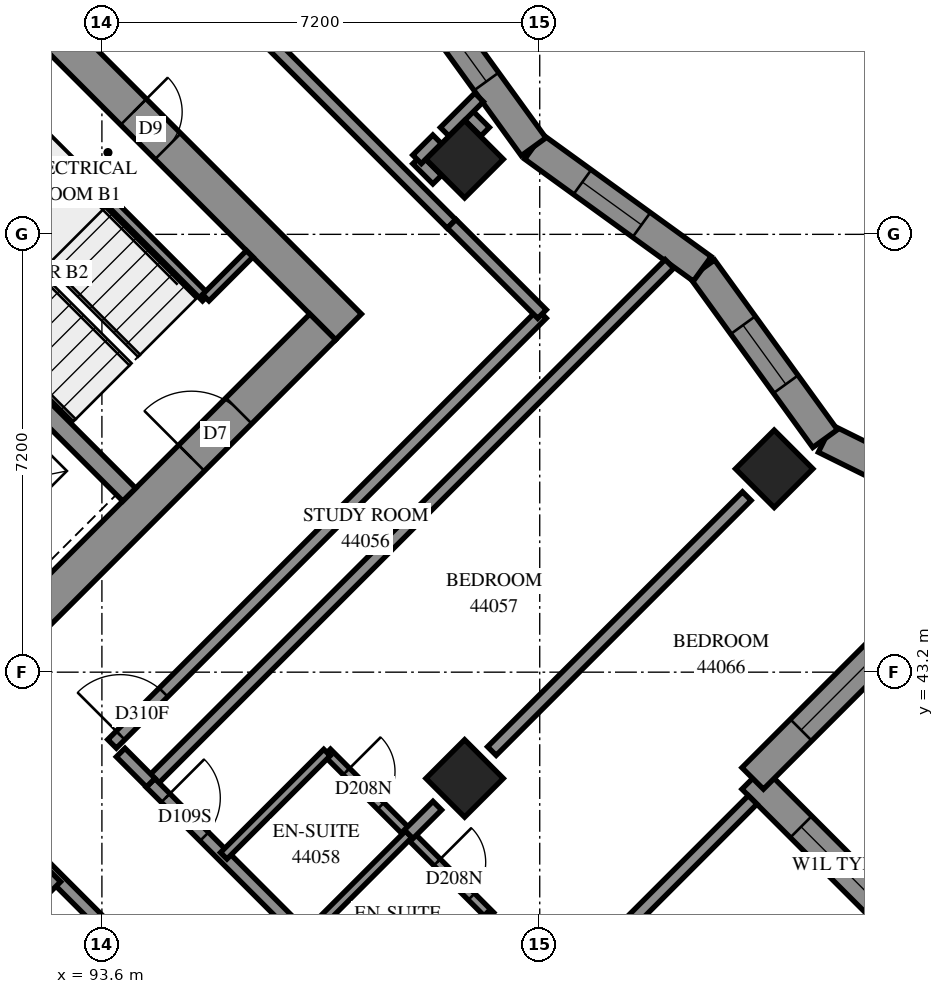
"""IFC4 building model, lengths in metres.
Left out: names, types, materials, properties, quantities, classifications, styles, units other than length and angle.
Written with IfcOpenShell. Run it as: python <this file> out.ifc"""

import sys

from ifc_helpers import new_model, si_unit, direction, frame, frame_2d, origin, origin_2d, place, context, subcontext, project, spatial, polyline, rectangle, outline, extrude, element, fill, save


model = new_model("IFC4")
c1 = context("Model", 3, precision=1e-05, world=origin(), true_north=direction((0.0, 1.0)))
c2 = subcontext(c1, "Body", "Model", "MODEL_VIEW")
j1 = project(units=[si_unit("LENGTHUNIT", "METRE"), si_unit("PLANEANGLEUNIT", "RADIAN")], contexts=[c1])
p1 = place(None, origin())
s1 = spatial("IfcSite", under=j1, at=p1, CompositionType="ELEMENT")
p2 = place(p1, origin())
s2 = spatial("IfcBuilding", under=s1, at=p2, CompositionType="ELEMENT")
p3 = place(p2, frame((0.0, 0.0, 162.6)))
s3 = spatial("IfcBuildingStorey", under=s2, at=p3, CompositionType="ELEMENT", Elevation=162.6)
for number, where, z_axis, x_axis in (
    (1, (99.565, 51.635, 0.0), (0.0, 0.0, 1.0), (0.707, -0.707, 0.0)),
    (2, (104.656, 46.544, 0.0), (0.0, 0.0, 1.0), (0.707, -0.707, 0.0)),
    (3, (99.565, 41.453, 0.0), (0.0, 0.0, 1.0), (0.707, -0.707, 0.0)),
):
    element("IfcColumn", number, at=place(p3, frame(where, z_axis=z_axis, x_axis=x_axis)), inside=s3, PredefinedType="COLUMN", context=c2, shape_type="SweptSolid", body=[
        extrude(rectangle(XDim=0.9, YDim=0.9, at=origin_2d()), origin(), (0.0, 0.0, 1.0), 3.1),
    ])
p4 = place(p3, frame((86.625, 59.908, -0.3), z_axis=(0.0, 0.0, 1.0), x_axis=(0.7071067812, -0.7071067812, 0.0)))
e4 = element("IfcWall", 4, at=p4, inside=s3, PredefinedType="SHEAR", context=c2, shape_type="SweptSolid", body=[
    extrude(rectangle(XDim=15.6, YDim=0.6, at=frame_2d((7.8, 0.0))), origin(), (0.0, 0.0, 1.0), 2.7),
])
p5 = place(p4, frame((10.6, 0.0, 0.3)))
e5 = element("IfcOpeningElement", 5, at=p5, cuts=e4, PredefinedType="OPENING", context=c2, shape_type="SweptSolid", body=[
    extrude(rectangle(XDim=0.8, YDim=2.1, at=frame_2d((0.4, 1.05))), frame((0.0, 0.31, 0.0), z_axis=(0.0, -1.0, 0.0), x_axis=(1.0, 0.0, 0.0)), (0.0, 0.0, 1.0), 0.62),
])
p6 = place(p3, frame((87.049, 38.695, -0.3), z_axis=(0.0, 0.0, 1.0), x_axis=(0.7071067812, 0.7071067812, 0.0)))
e6 = element("IfcWall", 6, at=p6, inside=s3, PredefinedType="SHEAR", context=c2, shape_type="SweptSolid", body=[
    extrude(rectangle(XDim=14.4, YDim=0.6, at=frame_2d((7.2, 0.0))), origin(), (0.0, 0.0, 1.0), 2.7),
])
p7 = place(p6, frame((4.55, 0.0, 0.3)))
e7 = element("IfcOpeningElement", 7, at=p7, cuts=e6, PredefinedType="OPENING", context=c2, shape_type="SweptSolid", body=[
    extrude(rectangle(XDim=1.1, YDim=2.1, at=frame_2d((0.55, 1.05))), frame((0.0, 0.31, 0.0), z_axis=(0.0, -1.0, 0.0), x_axis=(1.0, 0.0, 0.0)), (0.0, 0.0, 1.0), 0.62),
])
p8 = place(p6, frame((11.35, 0.0, 0.3)))
e8 = element("IfcOpeningElement", 8, at=p8, cuts=e6, PredefinedType="OPENING", context=c2, shape_type="SweptSolid", body=[
    extrude(rectangle(XDim=1.1, YDim=2.1, at=frame_2d((0.55, 1.05))), frame((0.0, 0.31, 0.0), z_axis=(0.0, -1.0, 0.0), x_axis=(1.0, 0.0, 0.0)), (0.0, 0.0, 1.0), 0.62),
])
p9 = place(p3, frame((88.958, 51.211, 0.0), z_axis=(0.0, 0.0, 1.0), x_axis=(0.7070998367, -0.7071137256, 0.0)))
e9 = element("IfcWall", 9, at=p9, inside=s3, PredefinedType="SOLIDWALL", context=c2, shape_type="SweptSolid", body=[
    extrude(rectangle(XDim=7.2, YDim=0.3, at=frame_2d((3.6, 0.0))), origin(), (0.0, 0.0, 1.0), 3.1),
])
p10 = place(p3, frame((107.761, 37.994, 0.0), z_axis=(0.0, 0.0, 1.0), x_axis=(-0.707127224, 0.7070863378, 0.0)))
e10 = element("IfcWall", 10, at=p10, inside=s3, PredefinedType="SOLIDWALL", context=c2, shape_type="SweptSolid", body=[
    extrude(outline(polyline([(-0.159, -0.25), (4.642, -0.25), (5.142, 0.25), (0.159, 0.25), (-0.159, -0.25)])), origin(), (0.0, 0.0, 1.0), 3.1),
])
p11 = place(p10, frame((1.967, 0.0, 0.6)))
e11 = element("IfcOpeningElement", 11, at=p11, cuts=e10, PredefinedType="OPENING", context=c2, shape_type="SweptSolid", body=[
    extrude(rectangle(XDim=1.8, YDim=1.9, at=frame_2d((0.9, 0.95))), frame((0.0, 0.26, 0.0), z_axis=(0.0, -1.0, 0.0), x_axis=(1.0, 0.0, 0.0)), (0.0, 0.0, 1.0), 0.52),
])
p12 = place(p3, frame((104.302, 41.453, 0.0), z_axis=(0.0, 0.0, 1.0), x_axis=(0.7071153373, 0.707098225, 0.0)))
e12 = element("IfcWall", 12, at=p12, inside=s3, PredefinedType="SOLIDWALL", context=c2, shape_type="SweptSolid", body=[
    extrude(outline(polyline([(0.25, -0.25), (6.192, -0.25), (5.495, 0.25), (-0.25, 0.25), (0.25, -0.25)])), origin(), (0.0, 0.0, 1.0), 3.1),
])
p13 = place(p12, frame((1.125, 0.0, 0.6)))
e13 = element("IfcOpeningElement", 13, at=p13, cuts=e12, PredefinedType="OPENING", context=c2, shape_type="SweptSolid", body=[
    extrude(rectangle(XDim=1.8, YDim=1.9, at=frame_2d((0.9, 0.95))), frame((0.0, 0.26, 0.0), z_axis=(0.0, -1.0, 0.0), x_axis=(1.0, 0.0, 0.0)), (0.0, 0.0, 1.0), 0.52),
])
p14 = place(p12, frame((3.973, 0.0, 0.6)))
e14 = element("IfcOpeningElement", 14, at=p14, cuts=e12, PredefinedType="OPENING", context=c2, shape_type="SweptSolid", body=[
    extrude(rectangle(XDim=1.2, YDim=1.9, at=frame_2d((0.6, 0.95))), frame((0.0, 0.26, 0.0), z_axis=(0.0, -1.0, 0.0), x_axis=(1.0, 0.0, 0.0)), (0.0, 0.0, 1.0), 0.52),
])
p15 = place(p3, frame((108.434, 45.585, 0.0), z_axis=(0.0, 0.0, 1.0), x_axis=(-0.8962055872, 0.443638981, 0.0)))
e15 = element("IfcWall", 15, at=p15, inside=s3, PredefinedType="SOLIDWALL", context=c2, shape_type="SweptSolid", body=[
    extrude(outline(polyline([(-0.348, -0.25), (3.22, -0.25), (3.344, 0.25), (0.348, 0.25), (-0.348, -0.25)])), origin(), (0.0, 0.0, 1.0), 3.1),
])
p16 = place(p15, frame((1.215, 0.0, 0.45)))
e16 = element("IfcOpeningElement", 16, at=p16, cuts=e15, PredefinedType="OPENING", context=c2, shape_type="SweptSolid", body=[
    extrude(rectangle(XDim=1.2, YDim=2.5, at=frame_2d((0.6, 1.25))), frame((0.0, 0.26, 0.0), z_axis=(0.0, -1.0, 0.0), x_axis=(1.0, 0.0, 0.0)), (0.0, 0.0, 1.0), 0.52),
])
p17 = place(p3, frame((105.493, 47.041, 0.0), z_axis=(0.0, 0.0, 1.0), x_axis=(-0.5862701639, 0.8101156059, 0.0)))
e17 = element("IfcWall", 17, at=p17, inside=s3, PredefinedType="SOLIDWALL", context=c2, shape_type="SweptSolid", body=[
    extrude(outline(polyline([(0.062, -0.25), (3.486, -0.25), (3.406, 0.25), (-0.062, 0.25), (0.062, -0.25)])), origin(), (0.0, 0.0, 1.0), 3.1),
])
p18 = place(p17, frame((1.103, 0.0, 0.45)))
e18 = element("IfcOpeningElement", 18, at=p18, cuts=e17, PredefinedType="OPENING", context=c2, shape_type="SweptSolid", body=[
    extrude(rectangle(XDim=1.2, YDim=2.5, at=frame_2d((0.6, 1.25))), frame((0.0, 0.26, 0.0), z_axis=(0.0, -1.0, 0.0), x_axis=(1.0, 0.0, 0.0)), (0.0, 0.0, 1.0), 0.52),
])
p19 = place(p3, frame((103.473, 49.833, 0.0), z_axis=(0.0, 0.0, 1.0), x_axis=(-0.8101205268, 0.586263364, 0.0)))
e19 = element("IfcWall", 19, at=p19, inside=s3, PredefinedType="SOLIDWALL", context=c2, shape_type="SweptSolid", body=[
    extrude(outline(polyline([(-0.04, -0.25), (3.384, -0.25), (3.464, 0.25), (0.04, 0.25), (-0.04, -0.25)])), origin(), (0.0, 0.0, 1.0), 3.1),
])
p20 = place(p19, frame((1.234, 0.0, 0.45)))
e20 = element("IfcOpeningElement", 20, at=p20, cuts=e19, PredefinedType="OPENING", context=c2, shape_type="SweptSolid", body=[
    extrude(rectangle(XDim=1.2, YDim=2.5, at=frame_2d((0.6, 1.25))), frame((0.0, 0.26, 0.0), z_axis=(0.0, -1.0, 0.0), x_axis=(1.0, 0.0, 0.0)), (0.0, 0.0, 1.0), 0.52),
])
p21 = place(p3, frame((100.699, 51.84, 0.0), z_axis=(0.0, 0.0, 1.0), x_axis=(-0.5862441964, 0.8101343976, 0.0)))
e21 = element("IfcWall", 21, at=p21, inside=s3, PredefinedType="SOLIDWALL", context=c2, shape_type="SweptSolid", body=[
    extrude(outline(polyline([(0.04, -0.25), (3.464, -0.25), (3.384, 0.25), (-0.04, 0.25), (0.04, -0.25)])), origin(), (0.0, 0.0, 1.0), 3.1),
])
p22 = place(p21, frame((1.325, 0.0, 0.45)))
e22 = element("IfcOpeningElement", 22, at=p22, cuts=e21, PredefinedType="OPENING", context=c2, shape_type="SweptSolid", body=[
    extrude(rectangle(XDim=1.2, YDim=2.5, at=frame_2d((0.6, 1.25))), frame((0.0, 0.26, 0.0), z_axis=(0.0, -1.0, 0.0), x_axis=(1.0, 0.0, 0.0)), (0.0, 0.0, 1.0), 0.52),
])
p23 = place(p3, frame((91.313, 53.354, 0.0), z_axis=(0.0, 0.0, 1.0), x_axis=(0.7071067812, -0.7071067812, 0.0)))
e23 = element("IfcWall", 23, at=p23, inside=s3, PredefinedType="PARTITIONING", context=c2, shape_type="SweptSolid", body=[
    extrude(rectangle(XDim=5.65, YDim=0.15, at=frame_2d((2.825, 0.0))), origin(), (0.0, 0.0, 1.0), 3.1),
])
p24 = place(p3, frame((95.308, 49.358, 0.0), z_axis=(0.0, 0.0, 1.0), x_axis=(0.70705776, 0.707155799, 0.0)))
e24 = element("IfcWall", 24, at=p24, inside=s3, PredefinedType="PARTITIONING", context=c2, shape_type="SweptSolid", body=[
    extrude(rectangle(XDim=1.02, YDim=0.15, at=frame_2d((0.51, 0.0))), origin(), (0.0, 0.0, 1.0), 3.1),
])
p25 = place(p3, frame((94.401, 41.383, 0.0), z_axis=(0.0, 0.0, 1.0), x_axis=(0.7071067812, 0.7071067812, 0.0)))
e25 = element("IfcWall", 25, at=p25, inside=s3, PredefinedType="PARTITIONING", context=c2, shape_type="SweptSolid", body=[
    extrude(rectangle(XDim=12.066, YDim=0.2, at=frame_2d((6.033, 0.0))), origin(), (0.0, 0.0, 1.0), 3.1),
])
p26 = place(p3, frame((92.209, 40.459, 0.0), z_axis=(0.0, 0.0, 1.0), x_axis=(0.7071067812, -0.7071067812, 0.0)))
e26 = element("IfcWall", 26, at=p26, inside=s3, PredefinedType="PARTITIONING", context=c2, shape_type="SweptSolid", body=[
    extrude(rectangle(XDim=11.698, YDim=0.2, at=frame_2d((5.849, 0.0))), origin(), (0.0, 0.0, 1.0), 3.1),
])
p27 = place(p26, frame((2.908, 0.0, 0.0)))
e27 = element("IfcOpeningElement", 27, at=p27, cuts=e26, PredefinedType="OPENING", context=c2, shape_type="SweptSolid", body=[
    extrude(rectangle(XDim=0.9, YDim=2.1, at=frame_2d((0.45, 1.05))), frame((0.0, 0.11, 0.0), z_axis=(0.0, -1.0, 0.0), x_axis=(1.0, 0.0, 0.0)), (0.0, 0.0, 1.0), 0.22),
])
p28 = place(p26, frame((10.181, 0.0, 0.0)))
e28 = element("IfcOpeningElement", 28, at=p28, cuts=e26, PredefinedType="OPENING", context=c2, shape_type="SweptSolid", body=[
    extrude(rectangle(XDim=0.9, YDim=2.1, at=frame_2d((0.45, 1.05))), frame((0.0, 0.11, 0.0), z_axis=(0.0, -1.0, 0.0), x_axis=(1.0, 0.0, 0.0)), (0.0, 0.0, 1.0), 0.22),
])
p29 = place(p3, frame((93.767, 42.021, 0.0), z_axis=(0.0, 0.0, 1.0), x_axis=(0.7071067812, 0.7071067812, 0.0)))
e29 = element("IfcWall", 29, at=p29, inside=s3, PredefinedType="PARTITIONING", context=c2, shape_type="SweptSolid", body=[
    extrude(rectangle(XDim=9.998, YDim=0.2, at=frame_2d((4.999, 0.0))), origin(), (0.0, 0.0, 1.0), 3.1),
])
p30 = place(p29, frame((0.196, 0.0, 0.0)))
e30 = element("IfcOpeningElement", 30, at=p30, cuts=e29, PredefinedType="OPENING", context=c2, shape_type="SweptSolid", body=[
    extrude(rectangle(XDim=1.0, YDim=2.1, at=frame_2d((0.5, 1.05))), frame((0.0, 0.11, 0.0), z_axis=(0.0, -1.0, 0.0), x_axis=(1.0, 0.0, 0.0)), (0.0, 0.0, 1.0), 0.22),
])
p31 = place(p3, frame((86.332, 33.309, 0.0), z_axis=(0.0, 0.0, 1.0), x_axis=(0.7072098544, 0.7070036929, 0.0)))
e31 = element("IfcWall", 31, at=p31, inside=s3, PredefinedType="PARTITIONING", context=c2, shape_type="SweptSolid", body=[
    extrude(rectangle(XDim=9.216, YDim=0.2, at=frame_2d((4.608, 0.0))), origin(), (0.0, 0.0, 1.0), 3.1),
])
p32 = place(p3, frame((99.494, 36.292, 0.0), z_axis=(0.0, 0.0, 1.0), x_axis=(0.7071067812, 0.7071067812, 0.0)))
e32 = element("IfcWall", 32, at=p32, inside=s3, PredefinedType="PARTITIONING", context=c2, shape_type="SweptSolid", body=[
    extrude(rectangle(XDim=6.799, YDim=0.2, at=frame_2d((3.4, 0.0))), origin(), (0.0, 0.0, 1.0), 3.1),
])
p33 = place(p3, frame((100.013, 41.903, 0.0), z_axis=(0.0, 0.0, 1.0), x_axis=(0.7071067812, 0.7071067812, 0.0)))
e33 = element("IfcWall", 33, at=p33, inside=s3, PredefinedType="PARTITIONING", context=c2, shape_type="SweptSolid", body=[
    extrude(rectangle(XDim=5.928, YDim=0.2, at=frame_2d((2.964, 0.0))), origin(), (0.0, 0.0, 1.0), 3.1),
])
p34 = place(p3, frame((96.379, 53.541, 0.0), z_axis=(0.0, 0.0, 1.0), x_axis=(0.7071067812, -0.7071067812, 0.0)))
e34 = element("IfcWall", 34, at=p34, inside=s3, PredefinedType="PARTITIONING", context=c2, shape_type="SweptSolid", body=[
    extrude(rectangle(XDim=4.2, YDim=0.2, at=frame_2d((2.1, 0.0))), origin(), (0.0, 0.0, 1.0), 3.1),
])
p35 = place(p3, frame((97.305, 41.881, 0.0), z_axis=(0.0, 0.0, 1.0), x_axis=(0.7067382634, -0.707475107, 0.0)))
e35 = element("IfcWall", 35, at=p35, inside=s3, PredefinedType="PARTITIONING", context=c2, shape_type="SweptSolid", body=[
    extrude(rectangle(XDim=3.8, YDim=0.15, at=frame_2d((1.9, 0.0))), origin(), (0.0, 0.0, 1.0), 3.1),
])
p36 = place(p35, frame((0.445, 0.0, 0.0)))
e36 = element("IfcOpeningElement", 36, at=p36, cuts=e35, PredefinedType="OPENING", context=c2, shape_type="SweptSolid", body=[
    extrude(rectangle(XDim=0.8, YDim=2.1, at=frame_2d((0.4, 1.05))), frame((0.0, 0.085, 0.0), z_axis=(0.0, -1.0, 0.0), x_axis=(1.0, 0.0, 0.0)), (0.0, 0.0, 1.0), 0.17),
])
p37 = place(p35, frame((2.556, 0.0, 0.0)))
e37 = element("IfcOpeningElement", 37, at=p37, cuts=e35, PredefinedType="OPENING", context=c2, shape_type="SweptSolid", body=[
    extrude(rectangle(XDim=0.8, YDim=2.1, at=frame_2d((0.4, 1.05))), frame((0.0, 0.085, 0.0), z_axis=(0.0, -1.0, 0.0), x_axis=(1.0, 0.0, 0.0)), (0.0, 0.0, 1.0), 0.17),
])
p38 = place(p3, frame((94.399, 41.379, 0.0), z_axis=(0.0, 0.0, 1.0), x_axis=(0.7071067812, -0.7071067812, 0.0)))
e38 = element("IfcWall", 38, at=p38, inside=s3, PredefinedType="PARTITIONING", context=c2, shape_type="SweptSolid", body=[
    extrude(rectangle(XDim=3.601, YDim=0.2, at=frame_2d((1.8, 0.0))), origin(), (0.0, 0.0, 1.0), 3.1),
])
p39 = place(p38, frame((0.35, 0.0, 0.0)))
e39 = element("IfcOpeningElement", 39, at=p39, cuts=e38, PredefinedType="OPENING", context=c2, shape_type="SweptSolid", body=[
    extrude(rectangle(XDim=0.9, YDim=2.1, at=frame_2d((0.45, 1.05))), frame((0.0, 0.11, 0.0), z_axis=(0.0, -1.0, 0.0), x_axis=(1.0, 0.0, 0.0)), (0.0, 0.0, 1.0), 0.22),
])
for number, where, z_axis, x_axis in (
    (40, (95.603, 40.181, 0.0), (0.0, 0.0, 1.0), (0.707, 0.707, 0.0)),
    (41, (96.947, 38.837, 0.0), (0.0, 0.0, 1.0), (0.707, 0.707, 0.0)),
):
    element("IfcWall", number, at=place(p3, frame(where, z_axis=z_axis, x_axis=x_axis)), inside=s3, PredefinedType="PARTITIONING", context=c2, shape_type="SweptSolid", body=[
        extrude(rectangle(XDim=2.401, YDim=0.15, at=frame_2d((1.201, 0.0))), origin(), (0.0, 0.0, 1.0), 3.1),
    ])
p40 = place(p3, frame((98.291, 37.495, 0.0), z_axis=(0.0, 0.0, 1.0), x_axis=(0.7071067812, 0.7071067812, 0.0)))
e42 = element("IfcWall", 42, at=p40, inside=s3, PredefinedType="PARTITIONING", context=c2, shape_type="SweptSolid", body=[
    extrude(rectangle(XDim=2.398, YDim=0.15, at=frame_2d((1.199, 0.0))), origin(), (0.0, 0.0, 1.0), 3.1),
])
p41 = place(p3, frame((99.352, 50.574, 0.0), z_axis=(0.0, 0.0, 1.0), x_axis=(0.7075827869, -0.7066304548, 0.0)))
e43 = element("IfcWall", 43, at=p41, inside=s3, PredefinedType="PARTITIONING", context=c2, shape_type="SweptSolid", body=[
    extrude(rectangle(XDim=2.1, YDim=0.2, at=frame_2d((1.05, 0.0))), origin(), (0.0, 0.0, 1.0), 3.1),
])
p42 = place(p3, frame((93.909, 41.879, 0.0), z_axis=(0.0, 0.0, 1.0), x_axis=(0.7056768426, -0.7085338339, 0.0)))
e44 = element("IfcWall", 44, at=p42, inside=s3, PredefinedType="PARTITIONING", context=c2, shape_type="SweptSolid", body=[
    extrude(rectangle(XDim=0.7, YDim=0.2, at=frame_2d((0.35, 0.0))), origin(), (0.0, 0.0, 1.0), 3.1),
])
p43 = place(p3, frame((98.645, 40.535, 0.0), z_axis=(0.0, 0.0, 1.0), x_axis=(0.7071067812, 0.7071067812, 0.0)))
e45 = element("IfcWall", 45, at=p43, inside=s3, PredefinedType="PARTITIONING", context=c2, shape_type="SweptSolid", body=[
    extrude(rectangle(XDim=0.665, YDim=0.2, at=frame_2d((0.332, 0.0))), origin(), (0.0, 0.0, 1.0), 3.1),
])
for number, where, z_axis, x_axis in (
    (46, (99.57, 52.418, 0.0), (0.0, 0.0, 1.0), (0.709, -0.705, 0.0)),
    (47, (98.784, 51.632, 0.0), (0.0, 0.0, 1.0), (0.705, -0.709, 0.0)),
):
    element("IfcWall", number, at=place(p3, frame(where, z_axis=z_axis, x_axis=x_axis)), inside=s3, PredefinedType="PARTITIONING", context=c2, shape_type="SweptSolid", body=[
        extrude(rectangle(XDim=0.468, YDim=0.2, at=frame_2d((0.234, 0.0))), origin(), (0.0, 0.0, 1.0), 3.1),
    ])
p44 = place(p3, frame((98.783, 51.633, 0.0), z_axis=(0.0, 0.0, 1.0), x_axis=(0.7071067812, 0.7071067812, 0.0)))
e48 = element("IfcWall", 48, at=p44, inside=s3, PredefinedType="PARTITIONING", context=c2, shape_type="SweptSolid", body=[
    extrude(rectangle(XDim=0.467, YDim=0.2, at=frame_2d((0.233, 0.0))), origin(), (0.0, 0.0, 1.0), 3.1),
])
p45 = place(p3, frame((99.237, 52.087, 0.0), z_axis=(0.0, 0.0, 1.0), x_axis=(0.7071067812, 0.7071067812, 0.0)))
e49 = element("IfcWall", 49, at=p45, inside=s3, PredefinedType="PARTITIONING", context=c2, shape_type="SweptSolid", body=[
    extrude(rectangle(XDim=0.8, YDim=0.2, at=frame_2d((0.4, 0.0))), origin(), (0.0, 0.0, 1.0), 3.1),
])
p46 = place(p11, origin())
e50 = element("IfcWindow", 50, at=p46, inside=s3, PartitioningType="SINGLE_PANEL", PredefinedType="WINDOW", context=c2, shape_type="SweptSolid", body=[
    extrude(rectangle(XDim=1.8, YDim=1.9, at=frame_2d((0.9, 0.95))), frame((0.0, 0.18, 0.0), z_axis=(0.0, -1.0, 0.0), x_axis=(1.0, 0.0, 0.0)), (0.0, 0.0, 1.0), 0.06),
])
fill(e11, e50)
p47 = place(p13, origin())
e51 = element("IfcWindow", 51, at=p47, inside=s3, PartitioningType="SINGLE_PANEL", PredefinedType="WINDOW", context=c2, shape_type="SweptSolid", body=[
    extrude(rectangle(XDim=1.8, YDim=1.9, at=frame_2d((0.9, 0.95))), frame((0.0, 0.18, 0.0), z_axis=(0.0, -1.0, 0.0), x_axis=(1.0, 0.0, 0.0)), (0.0, 0.0, 1.0), 0.06),
])
fill(e13, e51)
p48 = place(p18, origin())
e52 = element("IfcWindow", 52, at=p48, inside=s3, PartitioningType="SINGLE_PANEL", PredefinedType="WINDOW", context=c2, shape_type="SweptSolid", body=[
    extrude(rectangle(XDim=1.2, YDim=2.5, at=frame_2d((0.6, 1.25))), frame((0.0, 0.18, 0.0), z_axis=(0.0, -1.0, 0.0), x_axis=(1.0, 0.0, 0.0)), (0.0, 0.0, 1.0), 0.06),
])
fill(e18, e52)
p49 = place(p20, origin())
e53 = element("IfcWindow", 53, at=p49, inside=s3, PartitioningType="SINGLE_PANEL", PredefinedType="WINDOW", context=c2, shape_type="SweptSolid", body=[
    extrude(rectangle(XDim=1.2, YDim=2.5, at=frame_2d((0.6, 1.25))), frame((0.0, 0.18, 0.0), z_axis=(0.0, -1.0, 0.0), x_axis=(1.0, 0.0, 0.0)), (0.0, 0.0, 1.0), 0.06),
])
fill(e20, e53)
p50 = place(p22, origin())
e54 = element("IfcWindow", 54, at=p50, inside=s3, PartitioningType="SINGLE_PANEL", PredefinedType="WINDOW", context=c2, shape_type="SweptSolid", body=[
    extrude(rectangle(XDim=1.2, YDim=2.5, at=frame_2d((0.6, 1.25))), frame((0.0, 0.18, 0.0), z_axis=(0.0, -1.0, 0.0), x_axis=(1.0, 0.0, 0.0)), (0.0, 0.0, 1.0), 0.06),
])
fill(e22, e54)
p51 = place(p5, origin())
e55 = element("IfcDoor", 55, at=p51, inside=s3, OperationType="SINGLE_SWING_RIGHT", PredefinedType="DOOR", context=c2, shape_type="SweptSolid", body=[
    extrude(rectangle(XDim=0.8, YDim=2.1, at=frame_2d((0.4, 1.05))), frame((0.0, 0.025, 0.0), z_axis=(0.0, -1.0, 0.0), x_axis=(1.0, 0.0, 0.0)), (0.0, 0.0, 1.0), 0.05),
])
fill(e5, e55)
p52 = place(p8, origin())
e56 = element("IfcDoor", 56, at=p52, inside=s3, OperationType="SINGLE_SWING_RIGHT", PredefinedType="DOOR", context=c2, shape_type="SweptSolid", body=[
    extrude(rectangle(XDim=1.1, YDim=2.1, at=frame_2d((0.55, 1.05))), frame((0.0, 0.025, 0.0), z_axis=(0.0, -1.0, 0.0), x_axis=(1.0, 0.0, 0.0)), (0.0, 0.0, 1.0), 0.05),
])
fill(e8, e56)
p53 = place(p30, origin())
e57 = element("IfcDoor", 57, at=p53, inside=s3, OperationType="SINGLE_SWING_LEFT", PredefinedType="DOOR", context=c2, shape_type="SweptSolid", body=[
    extrude(rectangle(XDim=1.0, YDim=2.1, at=frame_2d((0.5, 1.05))), frame((0.0, 0.025, 0.0), z_axis=(0.0, -1.0, 0.0), x_axis=(1.0, 0.0, 0.0)), (0.0, 0.0, 1.0), 0.05),
])
fill(e30, e57)
p54 = place(p39, origin())
e58 = element("IfcDoor", 58, at=p54, inside=s3, OperationType="SINGLE_SWING_RIGHT", PredefinedType="DOOR", context=c2, shape_type="SweptSolid", body=[
    extrude(rectangle(XDim=0.9, YDim=2.1, at=frame_2d((0.45, 1.05))), frame((0.0, 0.025, 0.0), z_axis=(0.0, -1.0, 0.0), x_axis=(1.0, 0.0, 0.0)), (0.0, 0.0, 1.0), 0.05),
])
fill(e39, e58)
p55 = place(p36, origin())
e59 = element("IfcDoor", 59, at=p55, inside=s3, OperationType="SINGLE_SWING_RIGHT", PredefinedType="DOOR", context=c2, shape_type="SweptSolid", body=[
    extrude(rectangle(XDim=0.8, YDim=2.1, at=frame_2d((0.4, 1.05))), frame((0.0, 0.025, 0.0), z_axis=(0.0, -1.0, 0.0), x_axis=(1.0, 0.0, 0.0)), (0.0, 0.0, 1.0), 0.05),
])
fill(e36, e59)
p56 = place(p37, origin())
e60 = element("IfcDoor", 60, at=p56, inside=s3, OperationType="SINGLE_SWING_RIGHT", PredefinedType="DOOR", context=c2, shape_type="SweptSolid", body=[
    extrude(rectangle(XDim=0.8, YDim=2.1, at=frame_2d((0.4, 1.05))), frame((0.0, 0.025, 0.0), z_axis=(0.0, -1.0, 0.0), x_axis=(1.0, 0.0, 0.0)), (0.0, 0.0, 1.0), 0.05),
])
fill(e37, e60)
save(model, sys.argv[1])
